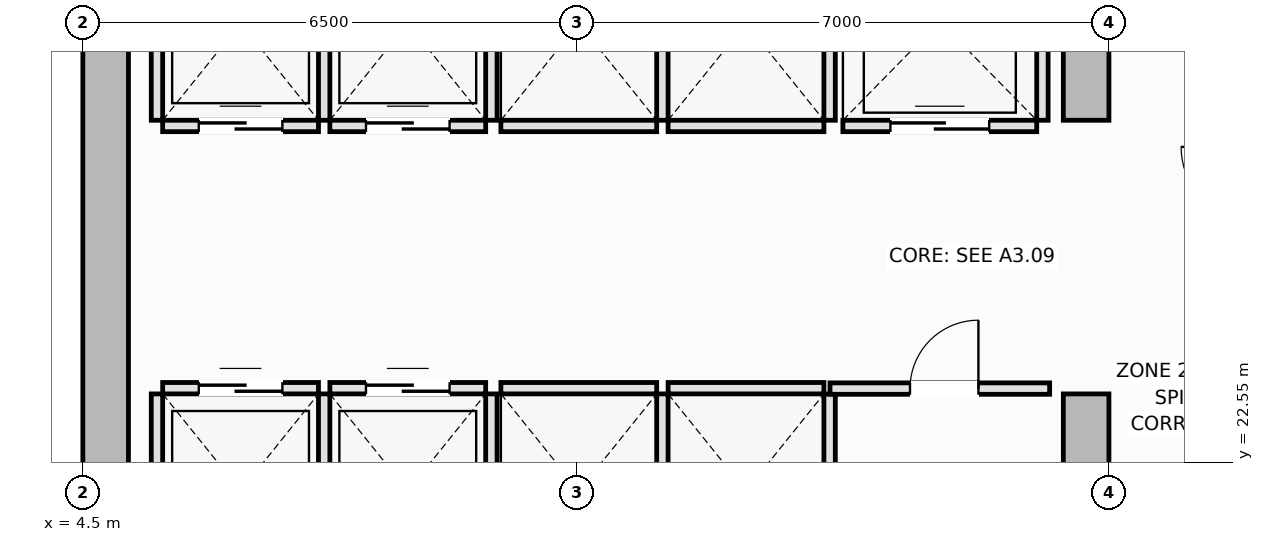
"""IFC4 building model, lengths in metres.
Left out: names, types, materials, properties, quantities, classifications, styles, units other than length and angle.
Written with IfcOpenShell. Run it as: python <this file> out.ifc"""

import sys

from ifc_helpers import new_model, si_unit, direction, frame, frame_2d, origin, place, context, subcontext, project, spatial, rectangle, extrude, element, fill, save


model = new_model("IFC4")
c1 = context("Model", 3, precision=1e-05, world=origin(), true_north=direction((0.0, 1.0)))
c2 = subcontext(c1, "Body", "Model", "MODEL_VIEW")
j1 = project(units=[si_unit("LENGTHUNIT", "METRE"), si_unit("PLANEANGLEUNIT", "RADIAN")], contexts=[c1])
p1 = place(None, origin())
s1 = spatial("IfcSite", under=j1, at=p1, CompositionType="ELEMENT")
p2 = place(p1, origin())
s2 = spatial("IfcBuilding", under=s1, at=p2, CompositionType="ELEMENT")
p3 = place(p2, frame((0.0, 0.0, 169.7)))
s3 = spatial("IfcBuildingStorey", under=s2, at=p3, CompositionType="ELEMENT", Elevation=169.7)
p4 = place(p3, frame((4.8, 14.6, 0.0), z_axis=(0.0, 0.0, 1.0), x_axis=(0.0, 1.0, 0.0)))
e1 = element("IfcWall", 1, at=p4, inside=s3, PredefinedType="SHEAR", context=c2, shape_type="SweptSolid", body=[
    extrude(rectangle(XDim=21.3, YDim=0.6, at=frame_2d((10.65, 0.0))), origin(), (0.0, 0.0, 1.0), 3.55),
])
p5 = place(p3, frame((17.7, 14.6, 0.0), z_axis=(0.0, 0.0, 1.0), x_axis=(0.0, 1.0, 0.0)))
e2 = element("IfcWall", 2, at=p5, inside=s3, PredefinedType="SHEAR", context=c2, shape_type="SweptSolid", body=[
    extrude(rectangle(XDim=8.85, YDim=0.6, at=frame_2d((4.425, 0.0))), origin(), (0.0, 0.0, 1.0), 3.55),
])
p6 = place(p5, frame((4.3, 0.0, 0.0)))
e3 = element("IfcOpeningElement", 3, at=p6, cuts=e2, PredefinedType="OPENING", context=c2, shape_type="SweptSolid", body=[
    extrude(rectangle(XDim=1.1, YDim=2.15, at=frame_2d((0.55, 1.075))), frame((0.0, 0.31, 0.0), z_axis=(0.0, -1.0, 0.0), x_axis=(1.0, 0.0, 0.0)), (0.0, 0.0, 1.0), 0.62),
])
p7 = place(p3, frame((17.7, 27.05, 0.0), z_axis=(0.0, 0.0, 1.0), x_axis=(0.0, 1.0, 0.0)))
e4 = element("IfcWall", 4, at=p7, inside=s3, PredefinedType="SHEAR", context=c2, shape_type="SweptSolid", body=[
    extrude(rectangle(XDim=8.85, YDim=0.6, at=frame_2d((4.425, 0.0))), origin(), (0.0, 0.0, 1.0), 3.55),
])
p8 = place(p7, frame((3.45, 0.0, 0.0)))
e5 = element("IfcOpeningElement", 5, at=p8, cuts=e4, PredefinedType="OPENING", context=c2, shape_type="SweptSolid", body=[
    extrude(rectangle(XDim=1.1, YDim=2.15, at=frame_2d((0.55, 1.075))), frame((0.0, 0.31, 0.0), z_axis=(0.0, -1.0, 0.0), x_axis=(1.0, 0.0, 0.0)), (0.0, 0.0, 1.0), 0.62),
])
p9 = place(p3, frame((5.55, 23.525, 0.0), z_axis=(0.0, 0.0, 1.0), x_axis=(1.0, 0.0, 0.0)))
e6 = element("IfcWall", 6, at=p9, inside=s3, PredefinedType="PARTITIONING", context=c2, shape_type="SweptSolid", body=[
    extrude(rectangle(XDim=2.05, YDim=0.15, at=frame_2d((1.025, 0.0))), origin(), (0.0, 0.0, 1.0), 3.35),
])
p10 = place(p9, frame((0.475, 0.0, 0.0)))
e7 = element("IfcOpeningElement", 7, at=p10, cuts=e6, PredefinedType="OPENING", context=c2, shape_type="SweptSolid", body=[
    extrude(rectangle(XDim=1.1, YDim=2.2, at=frame_2d((0.55, 1.1))), frame((0.0, 0.085, 0.0), z_axis=(0.0, -1.0, 0.0), x_axis=(1.0, 0.0, 0.0)), (0.0, 0.0, 1.0), 0.17),
])
for number, where, z_axis, x_axis in (
    (8, (5.475, 20.9, 0.0), (0.0, 0.0, 1.0), (0.0, 1.0, 0.0)),
    (9, (7.675, 20.9, 0.0), (0.0, 0.0, 1.0), (0.0, 1.0, 0.0)),
):
    element("IfcWall", number, at=place(p3, frame(where, z_axis=z_axis, x_axis=x_axis)), inside=s3, PredefinedType="PARTITIONING", context=c2, shape_type="SweptSolid", body=[
        extrude(rectangle(XDim=2.55, YDim=0.15, at=frame_2d((1.275, 0.0))), origin(), (0.0, 0.0, 1.0), 3.35),
    ])
p11 = place(p3, frame((7.75, 23.525, 0.0), z_axis=(0.0, 0.0, 1.0), x_axis=(1.0, 0.0, 0.0)))
e10 = element("IfcWall", 10, at=p11, inside=s3, PredefinedType="PARTITIONING", context=c2, shape_type="SweptSolid", body=[
    extrude(rectangle(XDim=2.05, YDim=0.15, at=frame_2d((1.025, 0.0))), origin(), (0.0, 0.0, 1.0), 3.35),
])
p12 = place(p11, frame((0.475, 0.0, 0.0)))
e11 = element("IfcOpeningElement", 11, at=p12, cuts=e10, PredefinedType="OPENING", context=c2, shape_type="SweptSolid", body=[
    extrude(rectangle(XDim=1.1, YDim=2.2, at=frame_2d((0.55, 1.1))), frame((0.0, 0.085, 0.0), z_axis=(0.0, -1.0, 0.0), x_axis=(1.0, 0.0, 0.0)), (0.0, 0.0, 1.0), 0.17),
])
p13 = place(p3, frame((9.875, 20.9, 0.0), z_axis=(0.0, 0.0, 1.0), x_axis=(0.0, 1.0, 0.0)))
e12 = element("IfcWall", 12, at=p13, inside=s3, PredefinedType="PARTITIONING", context=c2, shape_type="SweptSolid", body=[
    extrude(rectangle(XDim=2.55, YDim=0.15, at=frame_2d((1.275, 0.0))), origin(), (0.0, 0.0, 1.0), 3.35),
])
p14 = place(p3, frame((5.55, 26.975, 0.0), z_axis=(0.0, 0.0, 1.0), x_axis=(1.0, 0.0, 0.0)))
e13 = element("IfcWall", 13, at=p14, inside=s3, PredefinedType="PARTITIONING", context=c2, shape_type="SweptSolid", body=[
    extrude(rectangle(XDim=2.05, YDim=0.15, at=frame_2d((1.025, 0.0))), origin(), (0.0, 0.0, 1.0), 3.35),
])
p15 = place(p14, frame((0.475, 0.0, 0.0)))
e14 = element("IfcOpeningElement", 14, at=p15, cuts=e13, PredefinedType="OPENING", context=c2, shape_type="SweptSolid", body=[
    extrude(rectangle(XDim=1.1, YDim=2.2, at=frame_2d((0.55, 1.1))), frame((0.0, 0.085, 0.0), z_axis=(0.0, -1.0, 0.0), x_axis=(1.0, 0.0, 0.0)), (0.0, 0.0, 1.0), 0.17),
])
for number, where, z_axis, x_axis in (
    (15, (5.475, 27.05, 0.0), (0.0, 0.0, 1.0), (0.0, 1.0, 0.0)),
    (16, (7.675, 27.05, 0.0), (0.0, 0.0, 1.0), (0.0, 1.0, 0.0)),
):
    element("IfcWall", number, at=place(p3, frame(where, z_axis=z_axis, x_axis=x_axis)), inside=s3, PredefinedType="PARTITIONING", context=c2, shape_type="SweptSolid", body=[
        extrude(rectangle(XDim=2.55, YDim=0.15, at=frame_2d((1.275, 0.0))), origin(), (0.0, 0.0, 1.0), 3.35),
    ])
p16 = place(p3, frame((7.75, 26.975, 0.0), z_axis=(0.0, 0.0, 1.0), x_axis=(1.0, 0.0, 0.0)))
e17 = element("IfcWall", 17, at=p16, inside=s3, PredefinedType="PARTITIONING", context=c2, shape_type="SweptSolid", body=[
    extrude(rectangle(XDim=2.05, YDim=0.15, at=frame_2d((1.025, 0.0))), origin(), (0.0, 0.0, 1.0), 3.35),
])
p17 = place(p16, frame((0.475, 0.0, 0.0)))
e18 = element("IfcOpeningElement", 18, at=p17, cuts=e17, PredefinedType="OPENING", context=c2, shape_type="SweptSolid", body=[
    extrude(rectangle(XDim=1.1, YDim=2.2, at=frame_2d((0.55, 1.1))), frame((0.0, 0.085, 0.0), z_axis=(0.0, -1.0, 0.0), x_axis=(1.0, 0.0, 0.0)), (0.0, 0.0, 1.0), 0.17),
])
p18 = place(p3, frame((9.875, 27.05, 0.0), z_axis=(0.0, 0.0, 1.0), x_axis=(0.0, 1.0, 0.0)))
e19 = element("IfcWall", 19, at=p18, inside=s3, PredefinedType="PARTITIONING", context=c2, shape_type="SweptSolid", body=[
    extrude(rectangle(XDim=2.55, YDim=0.15, at=frame_2d((1.275, 0.0))), origin(), (0.0, 0.0, 1.0), 3.35),
])
p19 = place(p3, frame((10.0, 23.525, 0.0), z_axis=(0.0, 0.0, 1.0), x_axis=(1.0, 0.0, 0.0)))
e20 = element("IfcWall", 20, at=p19, inside=s3, PredefinedType="PARTITIONING", context=c2, shape_type="SweptSolid", body=[
    extrude(rectangle(XDim=2.05, YDim=0.15, at=frame_2d((1.025, 0.0))), origin(), (0.0, 0.0, 1.0), 3.35),
])
p20 = place(p3, frame((12.125, 20.9, 0.0), z_axis=(0.0, 0.0, 1.0), x_axis=(0.0, 1.0, 0.0)))
e21 = element("IfcWall", 21, at=p20, inside=s3, PredefinedType="PARTITIONING", context=c2, shape_type="SweptSolid", body=[
    extrude(rectangle(XDim=2.55, YDim=0.15, at=frame_2d((1.275, 0.0))), origin(), (0.0, 0.0, 1.0), 3.35),
])
p21 = place(p3, frame((12.2, 23.525, 0.0), z_axis=(0.0, 0.0, 1.0), x_axis=(1.0, 0.0, 0.0)))
e22 = element("IfcWall", 22, at=p21, inside=s3, PredefinedType="PARTITIONING", context=c2, shape_type="SweptSolid", body=[
    extrude(rectangle(XDim=2.05, YDim=0.15, at=frame_2d((1.025, 0.0))), origin(), (0.0, 0.0, 1.0), 3.35),
])
p22 = place(p3, frame((14.325, 20.9, 0.0), z_axis=(0.0, 0.0, 1.0), x_axis=(0.0, 1.0, 0.0)))
e23 = element("IfcWall", 23, at=p22, inside=s3, PredefinedType="PARTITIONING", context=c2, shape_type="SweptSolid", body=[
    extrude(rectangle(XDim=2.55, YDim=0.15, at=frame_2d((1.275, 0.0))), origin(), (0.0, 0.0, 1.0), 3.35),
])
p23 = place(p3, frame((10.0, 26.975, 0.0), z_axis=(0.0, 0.0, 1.0), x_axis=(1.0, 0.0, 0.0)))
e24 = element("IfcWall", 24, at=p23, inside=s3, PredefinedType="PARTITIONING", context=c2, shape_type="SweptSolid", body=[
    extrude(rectangle(XDim=2.05, YDim=0.15, at=frame_2d((1.025, 0.0))), origin(), (0.0, 0.0, 1.0), 3.35),
])
p24 = place(p3, frame((12.125, 27.05, 0.0), z_axis=(0.0, 0.0, 1.0), x_axis=(0.0, 1.0, 0.0)))
e25 = element("IfcWall", 25, at=p24, inside=s3, PredefinedType="PARTITIONING", context=c2, shape_type="SweptSolid", body=[
    extrude(rectangle(XDim=2.55, YDim=0.15, at=frame_2d((1.275, 0.0))), origin(), (0.0, 0.0, 1.0), 3.35),
])
p25 = place(p3, frame((12.2, 26.975, 0.0), z_axis=(0.0, 0.0, 1.0), x_axis=(1.0, 0.0, 0.0)))
e26 = element("IfcWall", 26, at=p25, inside=s3, PredefinedType="PARTITIONING", context=c2, shape_type="SweptSolid", body=[
    extrude(rectangle(XDim=2.05, YDim=0.15, at=frame_2d((1.025, 0.0))), origin(), (0.0, 0.0, 1.0), 3.35),
])
p26 = place(p3, frame((14.325, 27.05, 0.0), z_axis=(0.0, 0.0, 1.0), x_axis=(0.0, 1.0, 0.0)))
e27 = element("IfcWall", 27, at=p26, inside=s3, PredefinedType="PARTITIONING", context=c2, shape_type="SweptSolid", body=[
    extrude(rectangle(XDim=2.55, YDim=0.15, at=frame_2d((1.275, 0.0))), origin(), (0.0, 0.0, 1.0), 3.35),
])
p27 = place(p3, frame((14.5, 26.975, 0.0), z_axis=(0.0, 0.0, 1.0), x_axis=(1.0, 0.0, 0.0)))
e28 = element("IfcWall", 28, at=p27, inside=s3, PredefinedType="PARTITIONING", context=c2, shape_type="SweptSolid", body=[
    extrude(rectangle(XDim=2.55, YDim=0.15, at=frame_2d((1.275, 0.0))), origin(), (0.0, 0.0, 1.0), 3.35),
])
p28 = place(p27, frame((0.625, 0.0, 0.0)))
e29 = element("IfcOpeningElement", 29, at=p28, cuts=e28, PredefinedType="OPENING", context=c2, shape_type="SweptSolid", body=[
    extrude(rectangle(XDim=1.3, YDim=2.2, at=frame_2d((0.65, 1.1))), frame((0.0, 0.085, 0.0), z_axis=(0.0, -1.0, 0.0), x_axis=(1.0, 0.0, 0.0)), (0.0, 0.0, 1.0), 0.17),
])
p29 = place(p3, frame((17.125, 27.05, 0.0), z_axis=(0.0, 0.0, 1.0), x_axis=(0.0, 1.0, 0.0)))
e30 = element("IfcWall", 30, at=p29, inside=s3, PredefinedType="PARTITIONING", context=c2, shape_type="SweptSolid", body=[
    extrude(rectangle(XDim=2.6, YDim=0.15, at=frame_2d((1.3, 0.0))), origin(), (0.0, 0.0, 1.0), 3.35),
])
p30 = place(p3, frame((14.33, 23.52, 0.0), z_axis=(0.0, 0.0, 1.0), x_axis=(1.0, 0.0, 0.0)))
e31 = element("IfcWall", 31, at=p30, inside=s3, PredefinedType="PARTITIONING", context=c2, shape_type="SweptSolid", body=[
    extrude(rectangle(XDim=2.89, YDim=0.15, at=frame_2d((1.445, 0.0))), origin(), (0.0, 0.0, 1.0), 3.35),
])
p31 = place(p30, frame((1.053, 0.0, 0.0)))
e32 = element("IfcOpeningElement", 32, at=p31, cuts=e31, PredefinedType="OPENING", context=c2, shape_type="SweptSolid", body=[
    extrude(rectangle(XDim=0.9, YDim=2.1, at=frame_2d((0.45, 1.05))), frame((0.0, 0.085, 0.0), z_axis=(0.0, -1.0, 0.0), x_axis=(1.0, 0.0, 0.0)), (0.0, 0.0, 1.0), 0.17),
])
p32 = place(p10, origin())
e33 = element("IfcDoor", 33, at=p32, inside=s3, OperationType="DOUBLE_DOOR_SLIDING", PredefinedType="DOOR", context=c2, shape_type="SweptSolid", body=[
    extrude(rectangle(XDim=1.1, YDim=2.2, at=frame_2d((0.55, 1.1))), frame((0.0, 0.025, 0.0), z_axis=(0.0, -1.0, 0.0), x_axis=(1.0, 0.0, 0.0)), (0.0, 0.0, 1.0), 0.05),
])
fill(e7, e33)
p33 = place(p12, origin())
e34 = element("IfcDoor", 34, at=p33, inside=s3, OperationType="DOUBLE_DOOR_SLIDING", PredefinedType="DOOR", context=c2, shape_type="SweptSolid", body=[
    extrude(rectangle(XDim=1.1, YDim=2.2, at=frame_2d((0.55, 1.1))), frame((0.0, 0.025, 0.0), z_axis=(0.0, -1.0, 0.0), x_axis=(1.0, 0.0, 0.0)), (0.0, 0.0, 1.0), 0.05),
])
fill(e11, e34)
p34 = place(p15, origin())
e35 = element("IfcDoor", 35, at=p34, inside=s3, OperationType="DOUBLE_DOOR_SLIDING", PredefinedType="DOOR", context=c2, shape_type="SweptSolid", body=[
    extrude(rectangle(XDim=1.1, YDim=2.2, at=frame_2d((0.55, 1.1))), frame((0.0, 0.025, 0.0), z_axis=(0.0, -1.0, 0.0), x_axis=(1.0, 0.0, 0.0)), (0.0, 0.0, 1.0), 0.05),
])
fill(e14, e35)
p35 = place(p17, origin())
e36 = element("IfcDoor", 36, at=p35, inside=s3, OperationType="DOUBLE_DOOR_SLIDING", PredefinedType="DOOR", context=c2, shape_type="SweptSolid", body=[
    extrude(rectangle(XDim=1.1, YDim=2.2, at=frame_2d((0.55, 1.1))), frame((0.0, 0.025, 0.0), z_axis=(0.0, -1.0, 0.0), x_axis=(1.0, 0.0, 0.0)), (0.0, 0.0, 1.0), 0.05),
])
fill(e18, e36)
p36 = place(p28, origin())
e37 = element("IfcDoor", 37, at=p36, inside=s3, OperationType="DOUBLE_DOOR_SLIDING", PredefinedType="DOOR", context=c2, shape_type="SweptSolid", body=[
    extrude(rectangle(XDim=1.3, YDim=2.2, at=frame_2d((0.65, 1.1))), frame((0.0, 0.025, 0.0), z_axis=(0.0, -1.0, 0.0), x_axis=(1.0, 0.0, 0.0)), (0.0, 0.0, 1.0), 0.05),
])
fill(e29, e37)
p37 = place(p31, origin())
e38 = element("IfcDoor", 38, at=p37, inside=s3, OperationType="SINGLE_SWING_RIGHT", PredefinedType="DOOR", context=c2, shape_type="SweptSolid", body=[
    extrude(rectangle(XDim=0.9, YDim=2.1, at=frame_2d((0.45, 1.05))), frame((0.0, 0.025, 0.0), z_axis=(0.0, -1.0, 0.0), x_axis=(1.0, 0.0, 0.0)), (0.0, 0.0, 1.0), 0.05),
])
fill(e32, e38)
save(model, sys.argv[1])
